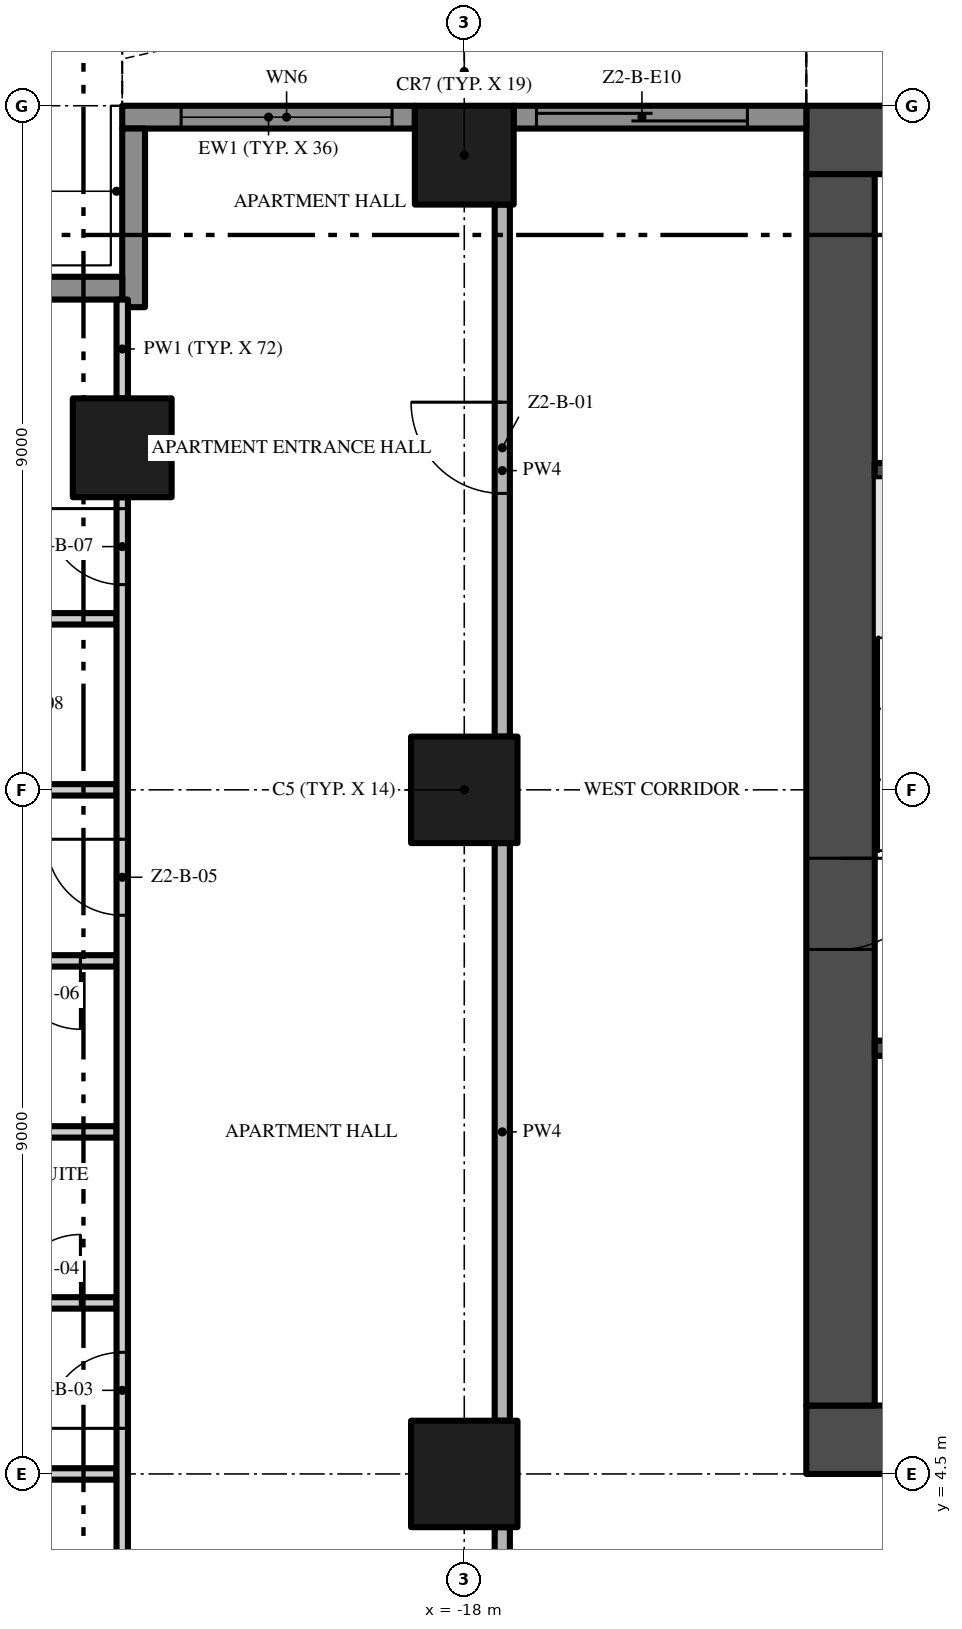
"""IFC4 building model, lengths in metres.
Left out: names, types, materials, properties, quantities, classifications, styles, units other than length and angle.
Written with IfcOpenShell. Run it as: python <this file> out.ifc"""

import sys

from ifc_helpers import new_model, si_unit, direction, frame, frame_2d, origin, origin_2d, place, context, subcontext, project, spatial, polyline, rectangle, outline, extrude, element, fill, save


model = new_model("IFC4")
c1 = context("Model", 3, precision=1e-05, world=origin(), true_north=direction((0.0, 1.0)))
c2 = subcontext(c1, "Body", "Model", "MODEL_VIEW")
j1 = project(units=[si_unit("LENGTHUNIT", "METRE"), si_unit("PLANEANGLEUNIT", "RADIAN")], contexts=[c1])
p1 = place(None, origin())
s1 = spatial("IfcSite", under=j1, at=p1, CompositionType="ELEMENT")
p2 = place(p1, origin())
s2 = spatial("IfcBuilding", under=s1, at=p2, CompositionType="ELEMENT")
p3 = place(p2, frame((0.0, 0.0, 80.8)))
s3 = spatial("IfcBuildingStorey", under=s2, at=p3, CompositionType="ELEMENT", Elevation=80.8)
p4 = place(p3, frame((-13.5, 4.95, -0.3), z_axis=(0.0, 0.0, 1.0), x_axis=(1.0, 0.0, 0.0)))
e1 = element("IfcWall", 1, at=p4, inside=s3, PredefinedType="SHEAR", context=c2, shape_type="SweptSolid", body=[
    extrude(rectangle(XDim=27.0, YDim=0.9, at=frame_2d((13.5, 0.0))), origin(), (0.0, 0.0, 1.0), 3.8),
])
p5 = place(p4, frame((12.0, 0.0, 0.3)))
e2 = element("IfcOpeningElement", 2, at=p5, cuts=e1, PredefinedType="OPENING", context=c2, shape_type="SweptSolid", body=[
    extrude(rectangle(XDim=3.0, YDim=2.4, at=frame_2d((1.5, 1.2))), frame((0.0, 0.46, 0.0), z_axis=(0.0, -1.0, 0.0), x_axis=(1.0, 0.0, 0.0)), (0.0, 0.0, 1.0), 0.92),
])
p6 = place(p4, frame((4.9, 0.0, 0.3)))
e3 = element("IfcOpeningElement", 3, at=p6, cuts=e1, PredefinedType="OPENING", context=c2, shape_type="SweptSolid", body=[
    extrude(rectangle(XDim=1.2, YDim=2.2, at=frame_2d((0.6, 1.1))), frame((0.0, 0.46, 0.0), z_axis=(0.0, -1.0, 0.0), x_axis=(1.0, 0.0, 0.0)), (0.0, 0.0, 1.0), 0.92),
])
p7 = place(p4, frame((20.75, 0.0, 0.3)))
e4 = element("IfcOpeningElement", 4, at=p7, cuts=e1, PredefinedType="OPENING", context=c2, shape_type="SweptSolid", body=[
    extrude(rectangle(XDim=1.5, YDim=2.2, at=frame_2d((0.75, 1.1))), frame((0.0, 0.46, 0.0), z_axis=(0.0, -1.0, 0.0), x_axis=(1.0, 0.0, 0.0)), (0.0, 0.0, 1.0), 0.92),
])
p8 = place(p4, frame((17.4, 0.0, 0.3)))
e5 = element("IfcOpeningElement", 5, at=p8, cuts=e1, PredefinedType="OPENING", context=c2, shape_type="SweptSolid", body=[
    extrude(rectangle(XDim=1.2, YDim=2.2, at=frame_2d((0.6, 1.1))), frame((0.0, 0.46, 0.0), z_axis=(0.0, -1.0, 0.0), x_axis=(1.0, 0.0, 0.0)), (0.0, 0.0, 1.0), 0.92),
])
p9 = place(p3, frame((13.5, 22.05, -0.3), z_axis=(0.0, 0.0, 1.0), x_axis=(-1.0, 0.0, 0.0)))
e6 = element("IfcWall", 6, at=p9, inside=s3, PredefinedType="SHEAR", context=c2, shape_type="SweptSolid", body=[
    extrude(rectangle(XDim=27.0, YDim=0.9, at=frame_2d((13.5, 0.0))), origin(), (0.0, 0.0, 1.0), 3.8),
])
p10 = place(p3, frame((-13.05, 21.6, -0.3), z_axis=(0.0, 0.0, 1.0), x_axis=(0.0, -1.0, 0.0)))
e7 = element("IfcWall", 7, at=p10, inside=s3, PredefinedType="SHEAR", context=c2, shape_type="SweptSolid", body=[
    extrude(rectangle(XDim=16.2, YDim=0.9, at=frame_2d((8.1, 0.0))), origin(), (0.0, 0.0, 1.0), 3.8),
])
p11 = place(p10, frame((9.0, 0.0, 0.3)))
e8 = element("IfcOpeningElement", 8, at=p11, cuts=e7, PredefinedType="OPENING", context=c2, shape_type="SweptSolid", body=[
    extrude(rectangle(XDim=1.2, YDim=2.2, at=frame_2d((0.6, 1.1))), frame((0.0, 0.46, 0.0), z_axis=(0.0, -1.0, 0.0), x_axis=(1.0, 0.0, 0.0)), (0.0, 0.0, 1.0), 0.92),
])
p12 = place(p3, frame((-18.0, 13.5, 0.0), z_axis=(0.0, 0.0, 1.0), x_axis=(1.0, 0.0, 0.0)))
e9 = element("IfcColumn", 9, at=p12, inside=s3, PredefinedType="COLUMN", context=c2, shape_type="SweptSolid", body=[
    extrude(rectangle(XDim=1.4, YDim=1.4, at=origin_2d()), origin(), (0.0, 0.0, 1.0), 3.5),
])
p13 = place(p3, frame((-18.0, 21.85, 0.0), z_axis=(0.0, 0.0, 1.0), x_axis=(1.0, 0.0, 0.0)))
e10 = element("IfcColumn", 10, at=p13, inside=s3, PredefinedType="COLUMN", context=c2, shape_type="SweptSolid", body=[
    extrude(rectangle(XDim=1.3, YDim=1.3, at=origin_2d()), origin(), (0.0, 0.0, 1.0), 3.5),
])
p14 = place(p3, frame((-18.0, 4.5, 0.0), z_axis=(0.0, 0.0, 1.0), x_axis=(1.0, 0.0, 0.0)))
e11 = element("IfcColumn", 11, at=p14, inside=s3, PredefinedType="COLUMN", context=c2, shape_type="SweptSolid", body=[
    extrude(rectangle(XDim=1.4, YDim=1.4, at=origin_2d()), origin(), (0.0, 0.0, 1.0), 3.5),
])
p15 = place(p3, frame((-22.5, 18.0, 0.0), z_axis=(0.0, 0.0, 1.0), x_axis=(1.0, 0.0, 0.0)))
e12 = element("IfcColumn", 12, at=p15, inside=s3, PredefinedType="COLUMN", context=c2, shape_type="SweptSolid", body=[
    extrude(rectangle(XDim=1.3, YDim=1.3, at=origin_2d()), origin(), (0.0, 0.0, 1.0), 3.5),
])
p16 = place(p3, frame((-17.35, 22.35, 0.0), z_axis=(0.0, 0.0, 1.0), x_axis=(1.0, 0.0, 0.0)))
e13 = element("IfcWall", 13, at=p16, inside=s3, PredefinedType="SOLIDWALL", context=c2, shape_type="SweptSolid", body=[
    extrude(rectangle(XDim=3.85, YDim=0.3, at=frame_2d((1.925, 0.0))), origin(), (0.0, 0.0, 1.0), 3.5),
])
p17 = place(p16, frame((0.3, 0.0, 0.0)))
e14 = element("IfcOpeningElement", 14, at=p17, cuts=e13, PredefinedType="OPENING", context=c2, shape_type="SweptSolid", body=[
    extrude(rectangle(XDim=2.775, YDim=2.4, at=frame_2d((1.387, 1.2))), frame((0.0, 0.16, 0.0), z_axis=(0.0, -1.0, 0.0), x_axis=(1.0, 0.0, 0.0)), (0.0, 0.0, 1.0), 0.32),
])
p18 = place(p3, frame((-22.5, 22.35, 0.0), z_axis=(0.0, 0.0, 1.0), x_axis=(1.0, 0.0, 0.0)))
e15 = element("IfcWall", 15, at=p18, inside=s3, PredefinedType="SOLIDWALL", context=c2, shape_type="SweptSolid", body=[
    extrude(rectangle(XDim=3.85, YDim=0.3, at=frame_2d((1.925, 0.0))), origin(), (0.0, 0.0, 1.0), 3.5),
])
p19 = place(p18, frame((0.775, 0.0, 0.45)))
e16 = element("IfcOpeningElement", 16, at=p19, cuts=e15, PredefinedType="OPENING", context=c2, shape_type="SweptSolid", body=[
    extrude(rectangle(XDim=2.775, YDim=2.65, at=frame_2d((1.387, 1.325))), frame((0.0, 0.16, 0.0), z_axis=(0.0, -1.0, 0.0), x_axis=(1.0, 0.0, 0.0)), (0.0, 0.0, 1.0), 0.32),
])
p20 = place(p3, frame((-22.35, 19.85, 0.0), z_axis=(0.0, 0.0, 1.0), x_axis=(0.0, 1.0, 0.0)))
e17 = element("IfcWall", 17, at=p20, inside=s3, PredefinedType="SOLIDWALL", context=c2, shape_type="SweptSolid", body=[
    extrude(rectangle(XDim=2.35, YDim=0.3, at=frame_2d((1.175, 0.0))), origin(), (0.0, 0.0, 1.0), 3.5),
])
p21 = place(p3, frame((-24.75, 20.1, 0.0), z_axis=(0.0, 0.0, 1.0), x_axis=(1.0, 0.0, 0.0)))
e18 = element("IfcWall", 18, at=p21, inside=s3, PredefinedType="SOLIDWALL", context=c2, shape_type="SweptSolid", body=[
    extrude(rectangle(XDim=2.25, YDim=0.3, at=frame_2d((1.125, 0.0))), origin(), (0.0, 0.0, 1.0), 3.5),
])
p22 = place(p3, origin())
e19 = element("IfcWall", 19, at=p22, inside=s3, PredefinedType="USERDEFINED", context=c2, shape_type="SweptSolid", body=[
    extrude(outline(polyline([(-13.5, 25.149), (-15.0, 25.485), (-15.375, 25.5), (-16.5, 25.369), (-18.0, 24.845), (-19.5, 24.112), (-21.0, 23.451), (-22.5, 23.115), (-22.445, 22.871), (-20.921, 23.213), (-19.395, 23.885), (-17.904, 24.614), (-16.444, 25.124), (-15.365, 25.249), (-15.033, 25.236), (-13.555, 24.905), (-13.5, 25.149)])), origin(), (0.0, 0.0, 1.0), 0.9),
])
for number, where, z_axis, x_axis in (
    (20, (-12.6, 10.1, 0.0), (0.0, 0.0, 1.0), (1.0, 0.0, 0.0)),
    (21, (-12.6, 17.7, 0.0), (0.0, 0.0, 1.0), (1.0, 0.0, 0.0)),
):
    element("IfcWall", number, at=place(p3, frame(where, z_axis=z_axis, x_axis=x_axis)), inside=s3, PredefinedType="SHEAR", context=c2, shape_type="SweptSolid", body=[
        extrude(rectangle(XDim=2.95, YDim=0.2, at=frame_2d((1.475, 0.0))), origin(), (0.0, 0.0, 1.0), 3.5),
    ])
p23 = place(p3, frame((-25.7, 4.5, 0.0), z_axis=(0.0, 0.0, 1.0), x_axis=(1.0, 0.0, 0.0)))
e22 = element("IfcWall", 22, at=p23, inside=s3, PredefinedType="PARTITIONING", context=c2, shape_type="SweptSolid", body=[
    extrude(rectangle(XDim=3.125, YDim=0.15, at=frame_2d((1.562, 0.0))), origin(), (0.0, 0.0, 1.0), 3.5),
])
p24 = place(p3, frame((-24.45, 6.75, 0.0), z_axis=(0.0, 0.0, 1.0), x_axis=(1.0, 0.0, 0.0)))
e23 = element("IfcWall", 23, at=p24, inside=s3, PredefinedType="PARTITIONING", context=c2, shape_type="SweptSolid", body=[
    extrude(rectangle(XDim=1.875, YDim=0.15, at=frame_2d((0.938, 0.0))), origin(), (0.0, 0.0, 1.0), 3.5),
])
p25 = place(p24, frame((0.5, 0.0, 0.0)))
e24 = element("IfcOpeningElement", 24, at=p25, cuts=e23, PredefinedType="OPENING", context=c2, shape_type="SweptSolid", body=[
    extrude(rectangle(XDim=0.9, YDim=2.1, at=frame_2d((0.45, 1.05))), frame((0.0, 0.085, 0.0), z_axis=(0.0, -1.0, 0.0), x_axis=(1.0, 0.0, 0.0)), (0.0, 0.0, 1.0), 0.17),
])
p26 = place(p3, frame((-24.45, 9.0, 0.0), z_axis=(0.0, 0.0, 1.0), x_axis=(1.0, 0.0, 0.0)))
e25 = element("IfcWall", 25, at=p26, inside=s3, PredefinedType="PARTITIONING", context=c2, shape_type="SweptSolid", body=[
    extrude(rectangle(XDim=1.875, YDim=0.15, at=frame_2d((0.938, 0.0))), origin(), (0.0, 0.0, 1.0), 3.5),
])
p27 = place(p3, frame((-22.575, 11.25, 0.0), z_axis=(0.0, 0.0, 1.0), x_axis=(-1.0, 0.0, 0.0)))
e26 = element("IfcWall", 26, at=p27, inside=s3, PredefinedType="PARTITIONING", context=c2, shape_type="SweptSolid", body=[
    extrude(rectangle(XDim=1.875, YDim=0.15, at=frame_2d((0.938, 0.0))), origin(), (0.0, 0.0, 1.0), 3.5),
])
p28 = place(p27, frame((0.475, 0.0, 0.0)))
e27 = element("IfcOpeningElement", 27, at=p28, cuts=e26, PredefinedType="OPENING", context=c2, shape_type="SweptSolid", body=[
    extrude(rectangle(XDim=0.9, YDim=2.1, at=frame_2d((0.45, 1.05))), frame((0.0, 0.085, 0.0), z_axis=(0.0, -1.0, 0.0), x_axis=(1.0, 0.0, 0.0)), (0.0, 0.0, 1.0), 0.17),
])
p29 = place(p3, frame((-25.7, 13.5, 0.0), z_axis=(0.0, 0.0, 1.0), x_axis=(1.0, 0.0, 0.0)))
e28 = element("IfcWall", 28, at=p29, inside=s3, PredefinedType="PARTITIONING", context=c2, shape_type="SweptSolid", body=[
    extrude(rectangle(XDim=3.125, YDim=0.15, at=frame_2d((1.562, 0.0))), origin(), (0.0, 0.0, 1.0), 3.5),
])
p30 = place(p3, frame((-24.45, 15.75, 0.0), z_axis=(0.0, 0.0, 1.0), x_axis=(1.0, 0.0, 0.0)))
e29 = element("IfcWall", 29, at=p30, inside=s3, PredefinedType="PARTITIONING", context=c2, shape_type="SweptSolid", body=[
    extrude(rectangle(XDim=1.875, YDim=0.15, at=frame_2d((0.938, 0.0))), origin(), (0.0, 0.0, 1.0), 3.5),
])
p31 = place(p3, frame((-22.5, 0.1, 0.0), z_axis=(0.0, 0.0, 1.0), x_axis=(0.0, 1.0, 0.0)))
e30 = element("IfcWall", 30, at=p31, inside=s3, PredefinedType="PARTITIONING", context=c2, shape_type="SweptSolid", body=[
    extrude(rectangle(XDim=17.25, YDim=0.15, at=frame_2d((8.625, 0.0))), origin(), (0.0, 0.0, 1.0), 3.5),
])
p32 = place(p31, frame((1.65, 0.0, 0.0)))
e31 = element("IfcOpeningElement", 31, at=p32, cuts=e30, PredefinedType="OPENING", context=c2, shape_type="SweptSolid", body=[
    extrude(rectangle(XDim=1.0, YDim=2.4, at=frame_2d((0.5, 1.2))), frame((0.0, 0.085, 0.0), z_axis=(0.0, -1.0, 0.0), x_axis=(1.0, 0.0, 0.0)), (0.0, 0.0, 1.0), 0.17),
])
p33 = place(p31, frame((5.0, 0.0, 0.0)))
e32 = element("IfcOpeningElement", 32, at=p33, cuts=e30, PredefinedType="OPENING", context=c2, shape_type="SweptSolid", body=[
    extrude(rectangle(XDim=1.0, YDim=2.4, at=frame_2d((0.5, 1.2))), frame((0.0, 0.085, 0.0), z_axis=(0.0, -1.0, 0.0), x_axis=(1.0, 0.0, 0.0)), (0.0, 0.0, 1.0), 0.17),
])
p34 = place(p31, frame((11.75, 0.0, 0.0)))
e33 = element("IfcOpeningElement", 33, at=p34, cuts=e30, PredefinedType="OPENING", context=c2, shape_type="SweptSolid", body=[
    extrude(rectangle(XDim=1.0, YDim=2.4, at=frame_2d((0.5, 1.2))), frame((0.0, 0.085, 0.0), z_axis=(0.0, -1.0, 0.0), x_axis=(1.0, 0.0, 0.0)), (0.0, 0.0, 1.0), 0.17),
])
p35 = place(p31, frame((16.1, 0.0, 0.0)))
e34 = element("IfcOpeningElement", 34, at=p35, cuts=e30, PredefinedType="OPENING", context=c2, shape_type="SweptSolid", body=[
    extrude(rectangle(XDim=1.0, YDim=2.4, at=frame_2d((0.5, 1.2))), frame((0.0, 0.085, 0.0), z_axis=(0.0, -1.0, 0.0), x_axis=(1.0, 0.0, 0.0)), (0.0, 0.0, 1.0), 0.17),
])
p36 = place(p3, frame((-22.5, 18.65, 0.0), z_axis=(0.0, 0.0, 1.0), x_axis=(0.0, 1.0, 0.0)))
e35 = element("IfcWall", 35, at=p36, inside=s3, PredefinedType="PARTITIONING", context=c2, shape_type="SweptSolid", body=[
    extrude(rectangle(XDim=1.3, YDim=0.15, at=frame_2d((0.65, 0.0))), origin(), (0.0, 0.0, 1.0), 3.5),
])
p37 = place(p3, frame((-17.5, -0.2, 0.0), z_axis=(0.0, 0.0, 1.0), x_axis=(0.0, 1.0, 0.0)))
e36 = element("IfcWall", 36, at=p37, inside=s3, PredefinedType="PARTITIONING", context=c2, shape_type="SweptSolid", body=[
    extrude(rectangle(XDim=4.0, YDim=0.2, at=frame_2d((2.0, 0.0))), origin(), (0.0, 0.0, 1.0), 3.5),
])
p38 = place(p3, frame((-17.5, 5.2, 0.0), z_axis=(0.0, 0.0, 1.0), x_axis=(0.0, 1.0, 0.0)))
e37 = element("IfcWall", 37, at=p38, inside=s3, PredefinedType="PARTITIONING", context=c2, shape_type="SweptSolid", body=[
    extrude(rectangle(XDim=7.6, YDim=0.2, at=frame_2d((3.8, 0.0))), origin(), (0.0, 0.0, 1.0), 3.5),
])
p39 = place(p3, frame((-17.5, 14.2, 0.0), z_axis=(0.0, 0.0, 1.0), x_axis=(0.0, 1.0, 0.0)))
e38 = element("IfcWall", 38, at=p39, inside=s3, PredefinedType="PARTITIONING", context=c2, shape_type="SweptSolid", body=[
    extrude(rectangle(XDim=7.0, YDim=0.2, at=frame_2d((3.5, 0.0))), origin(), (0.0, 0.0, 1.0), 3.5),
])
p40 = place(p39, frame((3.2, 0.0, 0.0)))
e39 = element("IfcOpeningElement", 39, at=p40, cuts=e38, PredefinedType="OPENING", context=c2, shape_type="SweptSolid", body=[
    extrude(rectangle(XDim=1.2, YDim=2.4, at=frame_2d((0.6, 1.2))), frame((0.0, 0.11, 0.0), z_axis=(0.0, -1.0, 0.0), x_axis=(1.0, 0.0, 0.0)), (0.0, 0.0, 1.0), 0.22),
])
p41 = place(p17, origin())
e40 = element("IfcDoor", 40, at=p41, inside=s3, OperationType="SINGLE_SWING_LEFT", PredefinedType="DOOR", context=c2, shape_type="SweptSolid", body=[
    extrude(rectangle(XDim=2.775, YDim=2.4, at=frame_2d((1.387, 1.2))), frame((0.0, 0.025, 0.0), z_axis=(0.0, -1.0, 0.0), x_axis=(1.0, 0.0, 0.0)), (0.0, 0.0, 1.0), 0.05),
])
fill(e14, e40)
p42 = place(p19, origin())
e41 = element("IfcWindow", 41, at=p42, inside=s3, PartitioningType="SINGLE_PANEL", PredefinedType="WINDOW", context=c2, shape_type="SweptSolid", body=[
    extrude(rectangle(XDim=2.775, YDim=2.65, at=frame_2d((1.387, 1.325))), frame((0.0, 0.03, 0.0), z_axis=(0.0, -1.0, 0.0), x_axis=(1.0, 0.0, 0.0)), (0.0, 0.0, 1.0), 0.06),
])
fill(e16, e41)
p43 = place(p11, frame((1.2, 0.0, 0.0), z_axis=(0.0, 0.0, 1.0), x_axis=(-1.0, 0.0, 0.0)))
e42 = element("IfcDoor", 42, at=p43, inside=s3, OperationType="SINGLE_SWING_RIGHT", PredefinedType="DOOR", context=c2, shape_type="SweptSolid", body=[
    extrude(rectangle(XDim=1.2, YDim=2.2, at=frame_2d((0.6, 1.1))), frame((0.0, 0.025, 0.0), z_axis=(0.0, -1.0, 0.0), x_axis=(1.0, 0.0, 0.0)), (0.0, 0.0, 1.0), 0.05),
])
fill(e8, e42)
p44 = place(p40, origin())
e43 = element("IfcDoor", 43, at=p44, inside=s3, OperationType="SINGLE_SWING_RIGHT", PredefinedType="DOOR", context=c2, shape_type="SweptSolid", body=[
    extrude(rectangle(XDim=1.2, YDim=2.4, at=frame_2d((0.6, 1.2))), frame((0.0, 0.025, 0.0), z_axis=(0.0, -1.0, 0.0), x_axis=(1.0, 0.0, 0.0)), (0.0, 0.0, 1.0), 0.05),
])
fill(e39, e43)
p45 = place(p33, origin())
e44 = element("IfcDoor", 44, at=p45, inside=s3, OperationType="SINGLE_SWING_LEFT", PredefinedType="DOOR", context=c2, shape_type="SweptSolid", body=[
    extrude(rectangle(XDim=1.0, YDim=2.4, at=frame_2d((0.5, 1.2))), frame((0.0, 0.025, 0.0), z_axis=(0.0, -1.0, 0.0), x_axis=(1.0, 0.0, 0.0)), (0.0, 0.0, 1.0), 0.05),
])
fill(e32, e44)
p46 = place(p25, origin())
e45 = element("IfcDoor", 45, at=p46, inside=s3, OperationType="SINGLE_SWING_RIGHT", PredefinedType="DOOR", context=c2, shape_type="SweptSolid", body=[
    extrude(rectangle(XDim=0.9, YDim=2.1, at=frame_2d((0.45, 1.05))), frame((0.0, 0.025, 0.0), z_axis=(0.0, -1.0, 0.0), x_axis=(1.0, 0.0, 0.0)), (0.0, 0.0, 1.0), 0.05),
])
fill(e24, e45)
p47 = place(p34, origin())
e46 = element("IfcDoor", 46, at=p47, inside=s3, OperationType="SINGLE_SWING_RIGHT", PredefinedType="DOOR", context=c2, shape_type="SweptSolid", body=[
    extrude(rectangle(XDim=1.0, YDim=2.4, at=frame_2d((0.5, 1.2))), frame((0.0, 0.025, 0.0), z_axis=(0.0, -1.0, 0.0), x_axis=(1.0, 0.0, 0.0)), (0.0, 0.0, 1.0), 0.05),
])
fill(e33, e46)
p48 = place(p28, origin())
e47 = element("IfcDoor", 47, at=p48, inside=s3, OperationType="SINGLE_SWING_LEFT", PredefinedType="DOOR", context=c2, shape_type="SweptSolid", body=[
    extrude(rectangle(XDim=0.9, YDim=2.1, at=frame_2d((0.45, 1.05))), frame((0.0, 0.025, 0.0), z_axis=(0.0, -1.0, 0.0), x_axis=(1.0, 0.0, 0.0)), (0.0, 0.0, 1.0), 0.05),
])
fill(e27, e47)
p49 = place(p35, origin())
e48 = element("IfcDoor", 48, at=p49, inside=s3, OperationType="SINGLE_SWING_RIGHT", PredefinedType="DOOR", context=c2, shape_type="SweptSolid", body=[
    extrude(rectangle(XDim=1.0, YDim=2.4, at=frame_2d((0.5, 1.2))), frame((0.0, 0.025, 0.0), z_axis=(0.0, -1.0, 0.0), x_axis=(1.0, 0.0, 0.0)), (0.0, 0.0, 1.0), 0.05),
])
fill(e34, e48)
save(model, sys.argv[1])
